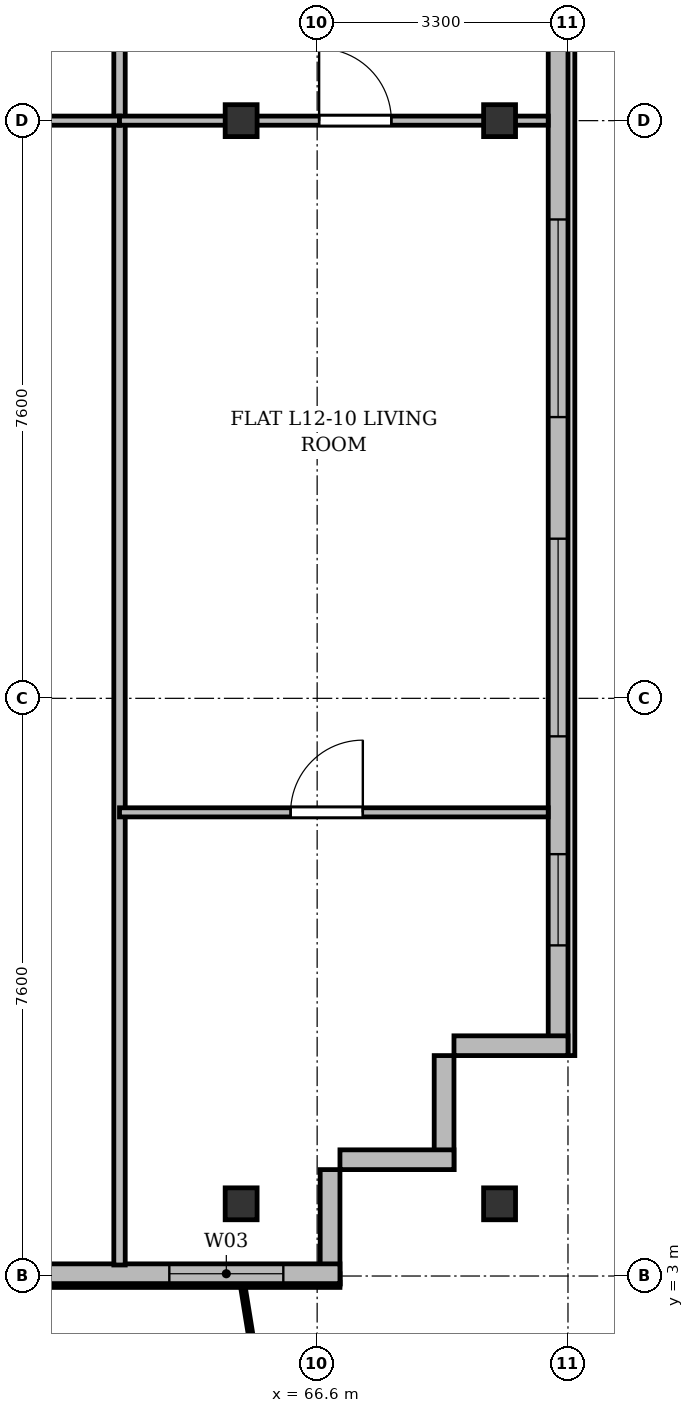
"""IFC4 building model, lengths in metres.
Left out: names, types, materials, properties, quantities, classifications, styles, units other than length and angle.
Written with IfcOpenShell. Run it as: python <this file> out.ifc"""

import sys

from ifc_helpers import new_model, si_unit, direction, frame, frame_2d, origin, origin_2d, place, context, subcontext, project, spatial, rectangle, i_section, extrude, source, transform, mapped, element, fill, save


model = new_model("IFC4")
c1 = context("Model", 3, precision=1e-05, world=origin(), true_north=direction((0.0, 1.0)))
c2 = subcontext(c1, "Body", "Model", "MODEL_VIEW")
j1 = project(units=[si_unit("LENGTHUNIT", "METRE"), si_unit("PLANEANGLEUNIT", "RADIAN")], contexts=[c1])
p1 = place(None, origin())
s1 = spatial("IfcSite", under=j1, at=p1, CompositionType="ELEMENT")
p2 = place(p1, origin())
s2 = spatial("IfcBuilding", under=s1, at=p2, CompositionType="ELEMENT")
p3 = place(p2, frame((0.0, 0.0, 48.7)))
s3 = spatial("IfcBuildingStorey", under=s2, at=p3, CompositionType="ELEMENT", Elevation=48.7)
m1 = source(origin(), c2, "Body", "SweptSolid", [
    extrude(i_section(OverallWidth=0.42, OverallDepth=0.42, WebThickness=0.026, FlangeThickness=0.04, at=origin_2d()), origin(), (0.0, 0.0, 1.0), 3.6),
])
for number, where, z_axis, x_axis in (
    (1, (65.6, 3.95, 0.0), (0.0, 0.0, 1.0), (1.0, 0.0, 0.0)),
    (2, (65.6, 18.2, 0.0), (0.0, 0.0, 1.0), (1.0, 0.0, 0.0)),
    (3, (69.0, 3.95, 0.0), (0.0, 0.0, 1.0), (1.0, 0.0, 0.0)),
    (4, (69.0, 18.2, 0.0), (0.0, 0.0, 1.0), (1.0, 0.0, 0.0)),
):
    element("IfcColumn", number, at=place(p3, frame(where, z_axis=z_axis, x_axis=x_axis)), inside=s3, PredefinedType="COLUMN", context=c2, shape_type="MappedRepresentation", body=[
        mapped(m1, transform((0.0, 0.0, 0.0), x_axis=(1.0, 0.0, 0.0), y_axis=(0.0, 1.0, 0.0), z_axis=(0.0, 0.0, 1.0), scale=1.0)),
    ])
p4 = place(p3, frame((69.77, 45.5, 0.0), z_axis=(0.0, 0.0, 1.0), x_axis=(0.0, -1.0, 0.0)))
e5 = element("IfcWall", 5, at=p4, inside=s3, PredefinedType="SOLIDWALL", context=c2, shape_type="SweptSolid", body=[
    extrude(rectangle(XDim=39.6, YDim=0.26, at=frame_2d((19.8, 0.0))), origin(), (0.0, 0.0, 1.0), 3.34),
])
p5 = place(p4, frame((36.95, 0.0, 0.92)))
e6 = element("IfcOpeningElement", 6, at=p5, cuts=e5, PredefinedType="OPENING", context=c2, shape_type="SweptSolid", body=[
    extrude(rectangle(XDim=1.2, YDim=1.65, at=frame_2d((0.6, 0.825))), frame((0.0, 0.14, 0.0), z_axis=(0.0, -1.0, 0.0), x_axis=(1.0, 0.0, 0.0)), (0.0, 0.0, 1.0), 0.28),
])
p6 = place(p4, frame((32.8, 0.0, 0.92)))
e7 = element("IfcOpeningElement", 7, at=p6, cuts=e5, PredefinedType="OPENING", context=c2, shape_type="SweptSolid", body=[
    extrude(rectangle(XDim=2.6, YDim=1.9, at=frame_2d((1.3, 0.95))), frame((0.0, 0.14, 0.0), z_axis=(0.0, -1.0, 0.0), x_axis=(1.0, 0.0, 0.0)), (0.0, 0.0, 1.0), 0.28),
])
p7 = place(p4, frame((28.6, 0.0, 0.92)))
e8 = element("IfcOpeningElement", 8, at=p7, cuts=e5, PredefinedType="OPENING", context=c2, shape_type="SweptSolid", body=[
    extrude(rectangle(XDim=2.6, YDim=1.9, at=frame_2d((1.3, 0.95))), frame((0.0, 0.14, 0.0), z_axis=(0.0, -1.0, 0.0), x_axis=(1.0, 0.0, 0.0)), (0.0, 0.0, 1.0), 0.28),
])
p8 = place(p4, frame((21.4, 0.0, 0.92)))
e9 = element("IfcOpeningElement", 9, at=p8, cuts=e5, PredefinedType="OPENING", context=c2, shape_type="SweptSolid", body=[
    extrude(rectangle(XDim=2.6, YDim=1.9, at=frame_2d((1.3, 0.95))), frame((0.0, 0.14, 0.0), z_axis=(0.0, -1.0, 0.0), x_axis=(1.0, 0.0, 0.0)), (0.0, 0.0, 1.0), 0.28),
])
p9 = place(p4, frame((7.4, 0.0, 0.92)))
e10 = element("IfcOpeningElement", 10, at=p9, cuts=e5, PredefinedType="OPENING", context=c2, shape_type="SweptSolid", body=[
    extrude(rectangle(XDim=2.6, YDim=1.9, at=frame_2d((1.3, 0.95))), frame((0.0, 0.14, 0.0), z_axis=(0.0, -1.0, 0.0), x_axis=(1.0, 0.0, 0.0)), (0.0, 0.0, 1.0), 0.28),
])
p10 = place(p4, frame((4.5, 0.0, 0.92)))
e11 = element("IfcOpeningElement", 11, at=p10, cuts=e5, PredefinedType="OPENING", context=c2, shape_type="SweptSolid", body=[
    extrude(rectangle(XDim=1.2, YDim=1.65, at=frame_2d((0.6, 0.825))), frame((0.0, 0.14, 0.0), z_axis=(0.0, -1.0, 0.0), x_axis=(1.0, 0.0, 0.0)), (0.0, 0.0, 1.0), 0.28),
])
p11 = place(p4, frame((1.15, 0.0, 0.92)))
e12 = element("IfcOpeningElement", 12, at=p11, cuts=e5, PredefinedType="OPENING", context=c2, shape_type="SweptSolid", body=[
    extrude(rectangle(XDim=1.2, YDim=1.65, at=frame_2d((0.6, 0.825))), frame((0.0, 0.14, 0.0), z_axis=(0.0, -1.0, 0.0), x_axis=(1.0, 0.0, 0.0)), (0.0, 0.0, 1.0), 0.28),
])
p12 = place(p3, frame((69.9, 6.03, 0.0), z_axis=(0.0, 0.0, 1.0), x_axis=(-1.0, 0.0, 0.0)))
e13 = element("IfcWall", 13, at=p12, inside=s3, PredefinedType="SOLIDWALL", context=c2, shape_type="SweptSolid", body=[
    extrude(rectangle(XDim=1.5, YDim=0.26, at=frame_2d((0.75, 0.0))), origin(), (0.0, 0.0, 1.0), 2.752),
])
for number, where, z_axis, x_axis in (
    (14, (68.27, 5.9, 0.0), (0.0, 0.0, 1.0), (0.0, -1.0, 0.0)),
    (15, (68.4, 4.53, 0.0), (0.0, 0.0, 1.0), (-1.0, 0.0, 0.0)),
):
    element("IfcWall", number, at=place(p3, frame(where, z_axis=z_axis, x_axis=x_axis)), inside=s3, PredefinedType="SOLIDWALL", context=c2, shape_type="SweptSolid", body=[
        extrude(rectangle(XDim=1.5, YDim=0.26, at=frame_2d((0.75, 0.0))), origin(), (0.0, 0.0, 1.0), 3.34),
    ])
p13 = place(p3, frame((66.77, 4.4, 0.0), z_axis=(0.0, 0.0, 1.0), x_axis=(0.0, -1.0, 0.0)))
e16 = element("IfcWall", 16, at=p13, inside=s3, PredefinedType="SOLIDWALL", context=c2, shape_type="SweptSolid", body=[
    extrude(rectangle(XDim=1.5, YDim=0.26, at=frame_2d((0.75, 0.0))), origin(), (0.0, 0.0, 1.0), 2.69),
])
p14 = place(p3, frame((66.9, 3.03, 0.0), z_axis=(0.0, 0.0, 1.0), x_axis=(-1.0, 0.0, 0.0)))
e17 = element("IfcWall", 17, at=p14, inside=s3, PredefinedType="SOLIDWALL", context=c2, shape_type="SweptSolid", body=[
    extrude(rectangle(XDim=59.4, YDim=0.26, at=frame_2d((29.7, 0.0))), origin(), (0.0, 0.0, 1.0), 3.34),
])
p15 = place(p14, frame((0.745, 0.0, 0.9)))
e18 = element("IfcOpeningElement", 18, at=p15, cuts=e17, PredefinedType="OPENING", context=c2, shape_type="SweptSolid", body=[
    extrude(rectangle(XDim=1.5, YDim=1.75, at=frame_2d((0.75, 0.875))), frame((0.0, 0.14, 0.0), z_axis=(0.0, -1.0, 0.0), x_axis=(1.0, 0.0, 0.0)), (0.0, 0.0, 1.0), 0.28),
])
p16 = place(p14, frame((4.5, 0.0, 0.9)))
e19 = element("IfcOpeningElement", 19, at=p16, cuts=e17, PredefinedType="OPENING", context=c2, shape_type="SweptSolid", body=[
    extrude(rectangle(XDim=2.0, YDim=1.95, at=frame_2d((1.0, 0.975))), frame((0.0, 0.14, 0.0), z_axis=(0.0, -1.0, 0.0), x_axis=(1.0, 0.0, 0.0)), (0.0, 0.0, 1.0), 0.28),
])
p17 = place(p14, frame((11.175, 0.0, 0.9)))
e20 = element("IfcOpeningElement", 20, at=p17, cuts=e17, PredefinedType="OPENING", context=c2, shape_type="SweptSolid", body=[
    extrude(rectangle(XDim=1.65, YDim=1.85, at=frame_2d((0.825, 0.925))), frame((0.0, 0.14, 0.0), z_axis=(0.0, -1.0, 0.0), x_axis=(1.0, 0.0, 0.0)), (0.0, 0.0, 1.0), 0.28),
])
p18 = place(p14, frame((17.007, 0.0, 0.0)))
e21 = element("IfcOpeningElement", 21, at=p18, cuts=e17, PredefinedType="OPENING", context=c2, shape_type="SweptSolid", body=[
    extrude(rectangle(XDim=1.2, YDim=2.2, at=frame_2d((0.6, 1.1))), frame((0.0, 0.14, 0.0), z_axis=(0.0, -1.0, 0.0), x_axis=(1.0, 0.0, 0.0)), (0.0, 0.0, 1.0), 0.28),
])
p19 = place(p14, frame((20.2, 0.0, 0.9)))
e22 = element("IfcOpeningElement", 22, at=p19, cuts=e17, PredefinedType="OPENING", context=c2, shape_type="SweptSolid", body=[
    extrude(rectangle(XDim=2.2, YDim=1.8, at=frame_2d((1.1, 0.9))), frame((0.0, 0.14, 0.0), z_axis=(0.0, -1.0, 0.0), x_axis=(1.0, 0.0, 0.0)), (0.0, 0.0, 1.0), 0.28),
])
p20 = place(p14, frame((24.75, 0.0, 0.9)))
e23 = element("IfcOpeningElement", 23, at=p20, cuts=e17, PredefinedType="OPENING", context=c2, shape_type="SweptSolid", body=[
    extrude(rectangle(XDim=1.5, YDim=1.75, at=frame_2d((0.75, 0.875))), frame((0.0, 0.14, 0.0), z_axis=(0.0, -1.0, 0.0), x_axis=(1.0, 0.0, 0.0)), (0.0, 0.0, 1.0), 0.28),
])
p21 = place(p14, frame((31.1, 0.0, 0.9)))
e24 = element("IfcOpeningElement", 24, at=p21, cuts=e17, PredefinedType="OPENING", context=c2, shape_type="SweptSolid", body=[
    extrude(rectangle(XDim=2.0, YDim=1.95, at=frame_2d((1.0, 0.975))), frame((0.0, 0.14, 0.0), z_axis=(0.0, -1.0, 0.0), x_axis=(1.0, 0.0, 0.0)), (0.0, 0.0, 1.0), 0.28),
])
p22 = place(p14, frame((39.075, 0.0, 0.9)))
e25 = element("IfcOpeningElement", 25, at=p22, cuts=e17, PredefinedType="OPENING", context=c2, shape_type="SweptSolid", body=[
    extrude(rectangle(XDim=1.65, YDim=1.85, at=frame_2d((0.825, 0.925))), frame((0.0, 0.14, 0.0), z_axis=(0.0, -1.0, 0.0), x_axis=(1.0, 0.0, 0.0)), (0.0, 0.0, 1.0), 0.28),
])
p23 = place(p14, frame((45.435, 0.0, 0.0)))
e26 = element("IfcOpeningElement", 26, at=p23, cuts=e17, PredefinedType="OPENING", context=c2, shape_type="SweptSolid", body=[
    extrude(rectangle(XDim=1.2, YDim=2.2, at=frame_2d((0.6, 1.1))), frame((0.0, 0.14, 0.0), z_axis=(0.0, -1.0, 0.0), x_axis=(1.0, 0.0, 0.0)), (0.0, 0.0, 1.0), 0.28),
])
p24 = place(p14, frame((48.25, 0.0, 0.9)))
e27 = element("IfcOpeningElement", 27, at=p24, cuts=e17, PredefinedType="OPENING", context=c2, shape_type="SweptSolid", body=[
    extrude(rectangle(XDim=2.2, YDim=1.8, at=frame_2d((1.1, 0.9))), frame((0.0, 0.14, 0.0), z_axis=(0.0, -1.0, 0.0), x_axis=(1.0, 0.0, 0.0)), (0.0, 0.0, 1.0), 0.28),
])
p25 = place(p14, frame((52.35, 0.0, 0.9)))
e28 = element("IfcOpeningElement", 28, at=p25, cuts=e17, PredefinedType="OPENING", context=c2, shape_type="SweptSolid", body=[
    extrude(rectangle(XDim=1.5, YDim=1.75, at=frame_2d((0.75, 0.875))), frame((0.0, 0.14, 0.0), z_axis=(0.0, -1.0, 0.0), x_axis=(1.0, 0.0, 0.0)), (0.0, 0.0, 1.0), 0.28),
])
p26 = place(p14, frame((56.105, 0.0, 0.9)))
e29 = element("IfcOpeningElement", 29, at=p26, cuts=e17, PredefinedType="OPENING", context=c2, shape_type="SweptSolid", body=[
    extrude(rectangle(XDim=2.0, YDim=1.95, at=frame_2d((1.0, 0.975))), frame((0.0, 0.14, 0.0), z_axis=(0.0, -1.0, 0.0), x_axis=(1.0, 0.0, 0.0)), (0.0, 0.0, 1.0), 0.28),
])
p27 = place(p3, frame((64.0, 3.145, 0.0), z_axis=(0.0, 0.0, 1.0), x_axis=(0.0, 1.0, 0.0)))
e30 = element("IfcWall", 30, at=p27, inside=s3, PredefinedType="PARTITIONING", context=c2, shape_type="SweptSolid", body=[
    extrude(rectangle(XDim=24.455, YDim=0.15, at=frame_2d((12.228, 0.0))), origin(), (0.0, 0.0, 1.0), 2.69),
])
p28 = place(p3, frame((58.8, 18.2, 0.0), z_axis=(0.0, 0.0, 1.0), x_axis=(1.0, 0.0, 0.0)))
e31 = element("IfcWall", 31, at=p28, inside=s3, PredefinedType="PARTITIONING", context=c2, shape_type="SweptSolid", body=[
    extrude(rectangle(XDim=5.2, YDim=0.12, at=frame_2d((2.6, 0.0))), origin(), (0.0, 0.0, 1.0), 2.69),
])
p29 = place(p28, frame((2.033, 0.0, 0.0)))
e32 = element("IfcOpeningElement", 32, at=p29, cuts=e31, PredefinedType="OPENING", context=c2, shape_type="SweptSolid", body=[
    extrude(rectangle(XDim=0.95, YDim=2.15, at=frame_2d((0.475, 1.075))), frame((0.0, 0.07, 0.0), z_axis=(0.0, -1.0, 0.0), x_axis=(1.0, 0.0, 0.0)), (0.0, 0.0, 1.0), 0.14),
])
p30 = place(p3, frame((64.0, 18.2, 0.0), z_axis=(0.0, 0.0, 1.0), x_axis=(1.0, 0.0, 0.0)))
e33 = element("IfcWall", 33, at=p30, inside=s3, PredefinedType="PARTITIONING", context=c2, shape_type="SweptSolid", body=[
    extrude(rectangle(XDim=5.64, YDim=0.12, at=frame_2d((2.82, 0.0))), origin(), (0.0, 0.0, 1.0), 2.69),
])
p31 = place(p30, frame((2.626, 0.0, 0.0)))
e34 = element("IfcOpeningElement", 34, at=p31, cuts=e33, PredefinedType="OPENING", context=c2, shape_type="SweptSolid", body=[
    extrude(rectangle(XDim=0.95, YDim=2.15, at=frame_2d((0.475, 1.075))), frame((0.0, 0.07, 0.0), z_axis=(0.0, -1.0, 0.0), x_axis=(1.0, 0.0, 0.0)), (0.0, 0.0, 1.0), 0.14),
])
p32 = place(p3, frame((64.0, 9.1, 0.0), z_axis=(0.0, 0.0, 1.0), x_axis=(1.0, 0.0, 0.0)))
e35 = element("IfcWall", 35, at=p32, inside=s3, PredefinedType="PARTITIONING", context=c2, shape_type="SweptSolid", body=[
    extrude(rectangle(XDim=5.64, YDim=0.12, at=frame_2d((2.82, 0.0))), origin(), (0.0, 0.0, 1.0), 2.752),
])
p33 = place(p32, frame((2.251, 0.0, 0.0)))
e36 = element("IfcOpeningElement", 36, at=p33, cuts=e35, PredefinedType="OPENING", context=c2, shape_type="SweptSolid", body=[
    extrude(rectangle(XDim=0.95, YDim=2.15, at=frame_2d((0.475, 1.075))), frame((0.0, 0.07, 0.0), z_axis=(0.0, -1.0, 0.0), x_axis=(1.0, 0.0, 0.0)), (0.0, 0.0, 1.0), 0.14),
])
m2 = source(origin(), c2, "Body", "SweptSolid", [
    extrude(rectangle(XDim=1.2, YDim=1.65, at=frame_2d((0.6, 0.825))), frame((0.0, 0.03, 0.0), z_axis=(0.0, -1.0, 0.0), x_axis=(1.0, 0.0, 0.0)), (0.0, 0.0, 1.0), 0.06),
])
p34 = place(p5, origin())
e37 = element("IfcWindow", 37, at=p34, inside=s3, PartitioningType="SINGLE_PANEL", PredefinedType="WINDOW", context=c2, shape_type="MappedRepresentation", body=[
    mapped(m2, transform((0.0, 0.0, 0.0), x_axis=(1.0, 0.0, 0.0), y_axis=(0.0, 1.0, 0.0), z_axis=(0.0, 0.0, 1.0), scale=1.0)),
])
fill(e6, e37)
m3 = source(origin(), c2, "Body", "SweptSolid", [
    extrude(rectangle(XDim=2.6, YDim=1.9, at=frame_2d((1.3, 0.95))), frame((0.0, 0.03, 0.0), z_axis=(0.0, -1.0, 0.0), x_axis=(1.0, 0.0, 0.0)), (0.0, 0.0, 1.0), 0.06),
])
p35 = place(p6, origin())
e38 = element("IfcWindow", 38, at=p35, inside=s3, PartitioningType="SINGLE_PANEL", PredefinedType="WINDOW", context=c2, shape_type="MappedRepresentation", body=[
    mapped(m3, transform((0.0, 0.0, 0.0), x_axis=(1.0, 0.0, 0.0), y_axis=(0.0, 1.0, 0.0), z_axis=(0.0, 0.0, 1.0), scale=1.0)),
])
fill(e7, e38)
p36 = place(p7, origin())
e39 = element("IfcWindow", 39, at=p36, inside=s3, PartitioningType="SINGLE_PANEL", PredefinedType="WINDOW", context=c2, shape_type="MappedRepresentation", body=[
    mapped(m3, transform((0.0, 0.0, 0.0), x_axis=(1.0, 0.0, 0.0), y_axis=(0.0, 1.0, 0.0), z_axis=(0.0, 0.0, 1.0), scale=1.0)),
])
fill(e8, e39)
m4 = source(origin(), c2, "Body", "SweptSolid", [
    extrude(rectangle(XDim=1.5, YDim=1.75, at=frame_2d((0.75, 0.875))), frame((0.0, 0.03, 0.0), z_axis=(0.0, -1.0, 0.0), x_axis=(1.0, 0.0, 0.0)), (0.0, 0.0, 1.0), 0.06),
])
p37 = place(p15, origin())
e40 = element("IfcWindow", 40, at=p37, inside=s3, PartitioningType="SINGLE_PANEL", PredefinedType="WINDOW", context=c2, shape_type="MappedRepresentation", body=[
    mapped(m4, transform((0.0, 0.0, 0.0), x_axis=(1.0, 0.0, 0.0), y_axis=(0.0, 1.0, 0.0), z_axis=(0.0, 0.0, 1.0), scale=1.0)),
])
fill(e18, e40)
m5 = source(origin(), c2, "Body", "SweptSolid", [
    extrude(rectangle(XDim=0.95, YDim=2.15, at=frame_2d((0.475, 1.075))), frame((0.0, 0.025, 0.0), z_axis=(0.0, -1.0, 0.0), x_axis=(1.0, 0.0, 0.0)), (0.0, 0.0, 1.0), 0.05),
])
p38 = place(p31, origin())
e41 = element("IfcDoor", 41, at=p38, inside=s3, OperationType="SINGLE_SWING_LEFT", PredefinedType="DOOR", context=c2, shape_type="MappedRepresentation", body=[
    mapped(m5, transform((0.0, 0.0, 0.0), x_axis=(1.0, 0.0, 0.0), y_axis=(0.0, 1.0, 0.0), z_axis=(0.0, 0.0, 1.0), scale=1.0)),
])
fill(e34, e41)
p39 = place(p33, origin())
e42 = element("IfcDoor", 42, at=p39, inside=s3, OperationType="SINGLE_SWING_RIGHT", PredefinedType="DOOR", context=c2, shape_type="MappedRepresentation", body=[
    mapped(m5, transform((0.0, 0.0, 0.0), x_axis=(1.0, 0.0, 0.0), y_axis=(0.0, 1.0, 0.0), z_axis=(0.0, 0.0, 1.0), scale=1.0)),
])
fill(e36, e42)
save(model, sys.argv[1])
